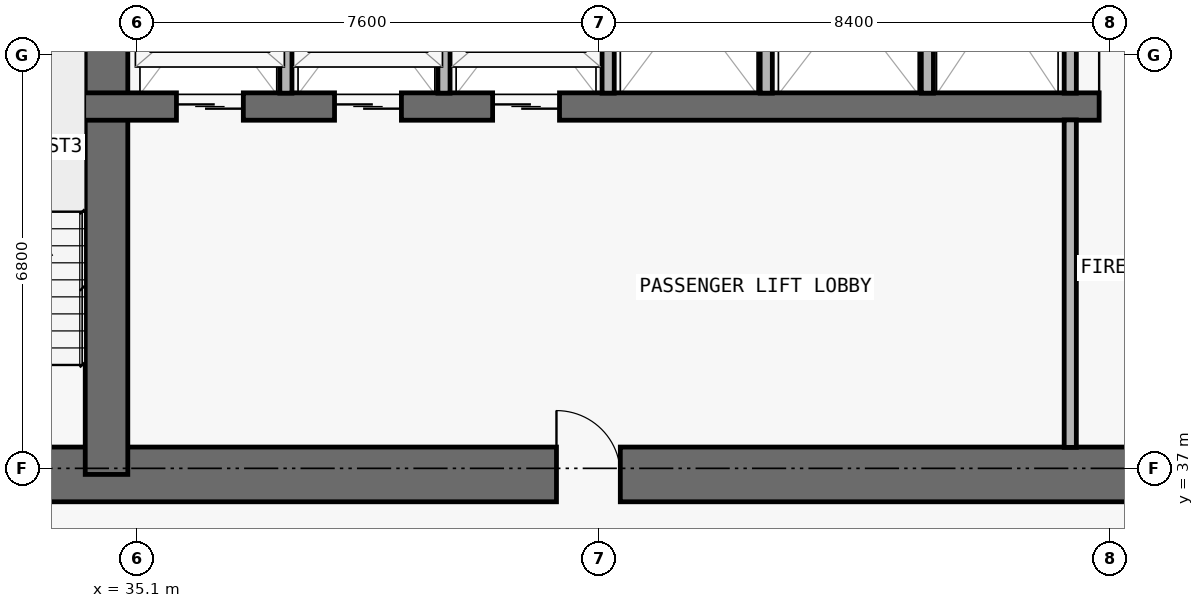
"""IFC4 building model, lengths in metres.
Left out: names, types, materials, properties, quantities, classifications, styles, units other than length and angle.
Written with IfcOpenShell. Run it as: python <this file> out.ifc"""

import sys

from ifc_helpers import new_model, si_unit, direction, frame, frame_2d, origin, place, context, subcontext, project, spatial, rectangle, extrude, element, fill, save


model = new_model("IFC4")
c1 = context("Model", 3, precision=1e-05, world=origin(), true_north=direction((0.0, 1.0)))
c2 = subcontext(c1, "Body", "Model", "MODEL_VIEW")
j1 = project(units=[si_unit("LENGTHUNIT", "METRE"), si_unit("PLANEANGLEUNIT", "RADIAN")], contexts=[c1])
p1 = place(None, origin())
s1 = spatial("IfcSite", under=j1, at=p1, CompositionType="ELEMENT")
p2 = place(p1, origin())
s2 = spatial("IfcBuilding", under=s1, at=p2, CompositionType="ELEMENT")
p3 = place(p2, frame((0.0, 0.0, 46.5)))
s3 = spatial("IfcBuildingStorey", under=s2, at=p3, CompositionType="ELEMENT", Elevation=46.5)
p4 = place(p3, frame((17.75, 36.9, 0.0), z_axis=(0.0, 0.0, 1.0), x_axis=(1.0, 0.0, 0.0)))
e1 = element("IfcWall", 1, at=p4, inside=s3, PredefinedType="SHEAR", context=c2, shape_type="SweptSolid", body=[
    extrude(rectangle(XDim=42.3, YDim=0.9, at=frame_2d((21.15, 0.0))), origin(), (0.0, 0.0, 1.0), 3.05),
])
p5 = place(p4, frame((14.55, 0.0, 0.0)))
e2 = element("IfcOpeningElement", 2, at=p5, cuts=e1, PredefinedType="OPENING", context=c2, shape_type="SweptSolid", body=[
    extrude(rectangle(XDim=1.1, YDim=2.15, at=frame_2d((0.55, 1.075))), frame((0.0, 0.46, 0.0), z_axis=(0.0, -1.0, 0.0), x_axis=(1.0, 0.0, 0.0)), (0.0, 0.0, 1.0), 0.92),
])
p6 = place(p4, frame((6.4, 0.0, 0.0)))
e3 = element("IfcOpeningElement", 3, at=p6, cuts=e1, PredefinedType="OPENING", context=c2, shape_type="SweptSolid", body=[
    extrude(rectangle(XDim=1.05, YDim=2.15, at=frame_2d((0.525, 1.075))), frame((0.0, 0.46, 0.0), z_axis=(0.0, -1.0, 0.0), x_axis=(1.0, 0.0, 0.0)), (0.0, 0.0, 1.0), 0.92),
])
p7 = place(p4, frame((34.9, 0.0, 0.0)))
e4 = element("IfcOpeningElement", 4, at=p7, cuts=e1, PredefinedType="OPENING", context=c2, shape_type="SweptSolid", body=[
    extrude(rectangle(XDim=1.05, YDim=2.15, at=frame_2d((0.525, 1.075))), frame((0.0, 0.46, 0.0), z_axis=(0.0, -1.0, 0.0), x_axis=(1.0, 0.0, 0.0)), (0.0, 0.0, 1.0), 0.92),
])
p8 = place(p4, frame((11.012, 0.0, 0.0)))
e5 = element("IfcOpeningElement", 5, at=p8, cuts=e1, PredefinedType="OPENING", context=c2, shape_type="SweptSolid", body=[
    extrude(rectangle(XDim=1.05, YDim=2.15, at=frame_2d((0.525, 1.075))), frame((0.0, 0.46, 0.0), z_axis=(0.0, -1.0, 0.0), x_axis=(1.0, 0.0, 0.0)), (0.0, 0.0, 1.0), 0.92),
])
p9 = place(p4, frame((24.25, 0.0, 0.0)))
e6 = element("IfcOpeningElement", 6, at=p9, cuts=e1, PredefinedType="OPENING", context=c2, shape_type="SweptSolid", body=[
    extrude(rectangle(XDim=1.05, YDim=2.15, at=frame_2d((0.525, 1.075))), frame((0.0, 0.46, 0.0), z_axis=(0.0, -1.0, 0.0), x_axis=(1.0, 0.0, 0.0)), (0.0, 0.0, 1.0), 0.92),
])
p10 = place(p3, frame((34.6, 36.9, 0.0), z_axis=(0.0, 0.0, 1.0), x_axis=(0.0, 1.0, 0.0)))
e7 = element("IfcWall", 7, at=p10, inside=s3, PredefinedType="SHEAR", context=c2, shape_type="SweptSolid", body=[
    extrude(rectangle(XDim=9.675, YDim=0.7, at=frame_2d((4.837, 0.0))), origin(), (0.0, 0.0, 1.0), 3.05),
])
p11 = place(p3, frame((22.25, 42.95, 0.0), z_axis=(0.0, 0.0, 1.0), x_axis=(1.0, 0.0, 0.0)))
e8 = element("IfcWall", 8, at=p11, inside=s3, PredefinedType="SHEAR", context=c2, shape_type="SweptSolid", body=[
    extrude(rectangle(XDim=33.3, YDim=0.45, at=frame_2d((16.65, 0.0))), origin(), (0.0, 0.0, 1.0), 3.05),
])
p12 = place(p11, frame((1.05, 0.0, 0.0)))
e9 = element("IfcOpeningElement", 9, at=p12, cuts=e8, PredefinedType="OPENING", context=c2, shape_type="SweptSolid", body=[
    extrude(rectangle(XDim=1.2, YDim=2.2, at=frame_2d((0.6, 1.1))), frame((0.0, 0.235, 0.0), z_axis=(0.0, -1.0, 0.0), x_axis=(1.0, 0.0, 0.0)), (0.0, 0.0, 1.0), 0.47),
])
p13 = place(p11, frame((31.05, 0.0, 0.0)))
e10 = element("IfcOpeningElement", 10, at=p13, cuts=e8, PredefinedType="OPENING", context=c2, shape_type="SweptSolid", body=[
    extrude(rectangle(XDim=1.2, YDim=2.2, at=frame_2d((0.6, 1.1))), frame((0.0, 0.235, 0.0), z_axis=(0.0, -1.0, 0.0), x_axis=(1.0, 0.0, 0.0)), (0.0, 0.0, 1.0), 0.47),
])
p14 = place(p11, frame((13.5, 0.0, 0.0)))
e11 = element("IfcOpeningElement", 11, at=p14, cuts=e8, PredefinedType="OPENING", context=c2, shape_type="SweptSolid", body=[
    extrude(rectangle(XDim=1.1, YDim=2.2, at=frame_2d((0.55, 1.1))), frame((0.0, 0.235, 0.0), z_axis=(0.0, -1.0, 0.0), x_axis=(1.0, 0.0, 0.0)), (0.0, 0.0, 1.0), 0.47),
])
p15 = place(p11, frame((16.1, 0.0, 0.0)))
e12 = element("IfcOpeningElement", 12, at=p15, cuts=e8, PredefinedType="OPENING", context=c2, shape_type="SweptSolid", body=[
    extrude(rectangle(XDim=1.1, YDim=2.2, at=frame_2d((0.55, 1.1))), frame((0.0, 0.235, 0.0), z_axis=(0.0, -1.0, 0.0), x_axis=(1.0, 0.0, 0.0)), (0.0, 0.0, 1.0), 0.47),
])
p16 = place(p11, frame((18.7, 0.0, 0.0)))
e13 = element("IfcOpeningElement", 13, at=p16, cuts=e8, PredefinedType="OPENING", context=c2, shape_type="SweptSolid", body=[
    extrude(rectangle(XDim=1.1, YDim=2.2, at=frame_2d((0.55, 1.1))), frame((0.0, 0.235, 0.0), z_axis=(0.0, -1.0, 0.0), x_axis=(1.0, 0.0, 0.0)), (0.0, 0.0, 1.0), 0.47),
])
p17 = place(p11, frame((3.625, 0.0, 0.0)))
e14 = element("IfcOpeningElement", 14, at=p17, cuts=e8, PredefinedType="OPENING", context=c2, shape_type="SweptSolid", body=[
    extrude(rectangle(XDim=1.05, YDim=2.15, at=frame_2d((0.525, 1.075))), frame((0.0, 0.235, 0.0), z_axis=(0.0, -1.0, 0.0), x_axis=(1.0, 0.0, 0.0)), (0.0, 0.0, 1.0), 0.47),
])
p18 = place(p11, frame((28.675, 0.0, 0.0)))
e15 = element("IfcOpeningElement", 15, at=p18, cuts=e8, PredefinedType="OPENING", context=c2, shape_type="SweptSolid", body=[
    extrude(rectangle(XDim=1.05, YDim=2.15, at=frame_2d((0.525, 1.075))), frame((0.0, 0.235, 0.0), z_axis=(0.0, -1.0, 0.0), x_axis=(1.0, 0.0, 0.0)), (0.0, 0.0, 1.0), 0.47),
])
for number, where, z_axis, x_axis in (
    (16, (37.55, 43.17, 0.0), (0.0, 0.0, 1.0), (0.0, 1.0, 0.0)),
    (17, (40.15, 43.17, 0.0), (0.0, 0.0, 1.0), (0.0, 1.0, 0.0)),
    (18, (42.85, 43.17, 0.0), (0.0, 0.0, 1.0), (0.0, 1.0, 0.0)),
    (19, (45.45, 43.17, 0.0), (0.0, 0.0, 1.0), (0.0, 1.0, 0.0)),
    (20, (48.1, 43.17, 0.0), (0.0, 0.0, 1.0), (0.0, 1.0, 0.0)),
):
    element("IfcWall", number, at=place(p3, frame(where, z_axis=z_axis, x_axis=x_axis)), inside=s3, PredefinedType="PARTITIONING", context=c2, shape_type="SweptSolid", body=[
        extrude(rectangle(XDim=3.185, YDim=0.2, at=frame_2d((1.593, 0.0))), origin(), (0.0, 0.0, 1.0), 3.05),
    ])
p19 = place(p3, frame((50.45, 37.345, 0.0), z_axis=(0.0, 0.0, 1.0), x_axis=(0.0, 1.0, 0.0)))
e21 = element("IfcWall", 21, at=p19, inside=s3, PredefinedType="PARTITIONING", context=c2, shape_type="SweptSolid", body=[
    extrude(rectangle(XDim=5.385, YDim=0.2, at=frame_2d((2.692, 0.0))), origin(), (0.0, 0.0, 1.0), 3.05),
])
p20 = place(p3, frame((50.45, 43.17, 0.0), z_axis=(0.0, 0.0, 1.0), x_axis=(0.0, 1.0, 0.0)))
e22 = element("IfcWall", 22, at=p20, inside=s3, PredefinedType="PARTITIONING", context=c2, shape_type="SweptSolid", body=[
    extrude(rectangle(XDim=3.185, YDim=0.2, at=frame_2d((1.593, 0.0))), origin(), (0.0, 0.0, 1.0), 3.05),
])
p21 = place(p14, origin())
e23 = element("IfcDoor", 23, at=p21, inside=s3, OperationType="DOUBLE_DOOR_SLIDING", PredefinedType="DOOR", context=c2, shape_type="SweptSolid", body=[
    extrude(rectangle(XDim=1.1, YDim=2.2, at=frame_2d((0.55, 1.1))), frame((0.0, 0.025, 0.0), z_axis=(0.0, -1.0, 0.0), x_axis=(1.0, 0.0, 0.0)), (0.0, 0.0, 1.0), 0.05),
])
fill(e11, e23)
p22 = place(p15, origin())
e24 = element("IfcDoor", 24, at=p22, inside=s3, OperationType="DOUBLE_DOOR_SLIDING", PredefinedType="DOOR", context=c2, shape_type="SweptSolid", body=[
    extrude(rectangle(XDim=1.1, YDim=2.2, at=frame_2d((0.55, 1.1))), frame((0.0, 0.025, 0.0), z_axis=(0.0, -1.0, 0.0), x_axis=(1.0, 0.0, 0.0)), (0.0, 0.0, 1.0), 0.05),
])
fill(e12, e24)
p23 = place(p16, origin())
e25 = element("IfcDoor", 25, at=p23, inside=s3, OperationType="DOUBLE_DOOR_SLIDING", PredefinedType="DOOR", context=c2, shape_type="SweptSolid", body=[
    extrude(rectangle(XDim=1.1, YDim=2.2, at=frame_2d((0.55, 1.1))), frame((0.0, 0.025, 0.0), z_axis=(0.0, -1.0, 0.0), x_axis=(1.0, 0.0, 0.0)), (0.0, 0.0, 1.0), 0.05),
])
fill(e13, e25)
p24 = place(p18, origin())
e26 = element("IfcDoor", 26, at=p24, inside=s3, OperationType="SINGLE_SWING_LEFT", PredefinedType="DOOR", context=c2, shape_type="SweptSolid", body=[
    extrude(rectangle(XDim=1.05, YDim=2.15, at=frame_2d((0.525, 1.075))), frame((0.0, 0.025, 0.0), z_axis=(0.0, -1.0, 0.0), x_axis=(1.0, 0.0, 0.0)), (0.0, 0.0, 1.0), 0.05),
])
fill(e15, e26)
p25 = place(p9, origin())
e27 = element("IfcDoor", 27, at=p25, inside=s3, OperationType="SINGLE_SWING_LEFT", PredefinedType="DOOR", context=c2, shape_type="SweptSolid", body=[
    extrude(rectangle(XDim=1.05, YDim=2.15, at=frame_2d((0.525, 1.075))), frame((0.0, 0.025, 0.0), z_axis=(0.0, -1.0, 0.0), x_axis=(1.0, 0.0, 0.0)), (0.0, 0.0, 1.0), 0.05),
])
fill(e6, e27)
save(model, sys.argv[1])
